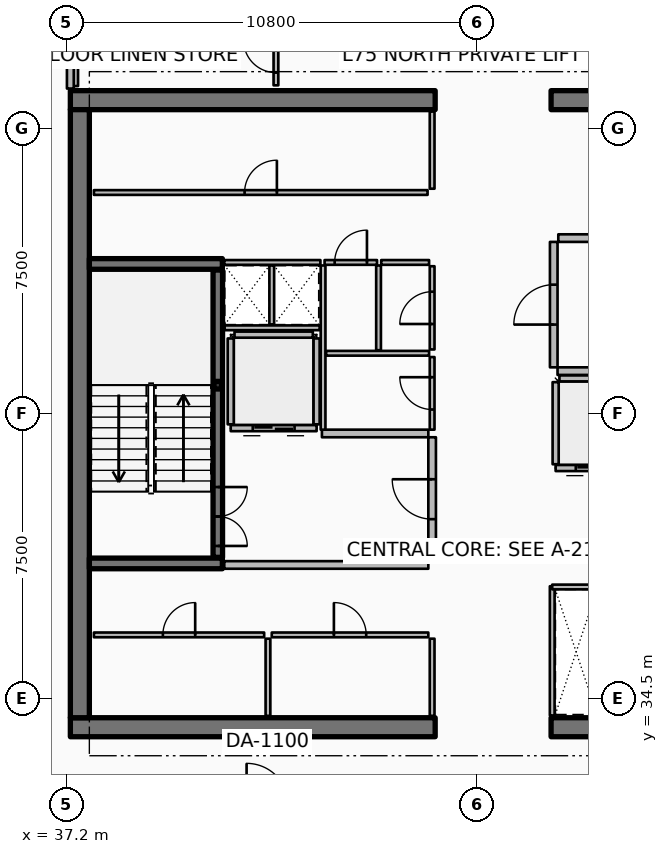
"""IFC4 building model, lengths in metres.
Left out: names, types, materials, properties, quantities, classifications, styles, units other than length and angle.
Written with IfcOpenShell. Run it as: python <this file> out.ifc"""

import sys

from ifc_helpers import new_model, si_unit, direction, frame, frame_2d, origin, origin_2d, place, context, subcontext, project, spatial, rectangle, hollow_rectangle, extrude, element, fill, save


model = new_model("IFC4")
c1 = context("Model", 3, precision=1e-05, world=origin(), true_north=direction((0.0, 1.0)))
c2 = subcontext(c1, "Body", "Model", "MODEL_VIEW")
j1 = project(units=[si_unit("LENGTHUNIT", "METRE"), si_unit("PLANEANGLEUNIT", "RADIAN")], contexts=[c1])
p1 = place(None, origin())
s1 = spatial("IfcSite", under=j1, at=p1, CompositionType="ELEMENT")
p2 = place(p1, origin())
s2 = spatial("IfcBuilding", under=s1, at=p2, CompositionType="ELEMENT")
p3 = place(p2, frame((0.0, 0.0, 298.3)))
s3 = spatial("IfcBuildingStorey", under=s2, at=p3, CompositionType="ELEMENT", Elevation=298.3)
p4 = place(p3, frame((37.3, 33.75, 0.0), z_axis=(0.0, 0.0, 1.0), x_axis=(1.0, 0.0, 0.0)))
e1 = element("IfcWall", 1, at=p4, inside=s3, PredefinedType="SHEAR", context=c2, shape_type="SweptSolid", body=[
    extrude(rectangle(XDim=9.6, YDim=0.5, at=frame_2d((4.8, 0.0))), origin(), (0.0, 0.0, 1.0), 3.85),
])
p5 = place(p3, frame((49.95, 33.75, 0.0), z_axis=(0.0, 0.0, 1.0), x_axis=(1.0, 0.0, 0.0)))
e2 = element("IfcWall", 2, at=p5, inside=s3, PredefinedType="SHEAR", context=c2, shape_type="SweptSolid", body=[
    extrude(rectangle(XDim=9.6, YDim=0.5, at=frame_2d((4.8, 0.0))), origin(), (0.0, 0.0, 1.0), 3.85),
])
p6 = place(p3, frame((37.3, 50.25, 0.0), z_axis=(0.0, 0.0, 1.0), x_axis=(1.0, 0.0, 0.0)))
e3 = element("IfcWall", 3, at=p6, inside=s3, PredefinedType="SHEAR", context=c2, shape_type="SweptSolid", body=[
    extrude(rectangle(XDim=9.6, YDim=0.5, at=frame_2d((4.8, 0.0))), origin(), (0.0, 0.0, 1.0), 3.85),
])
p7 = place(p3, frame((49.95, 50.25, 0.0), z_axis=(0.0, 0.0, 1.0), x_axis=(1.0, 0.0, 0.0)))
e4 = element("IfcWall", 4, at=p7, inside=s3, PredefinedType="SHEAR", context=c2, shape_type="SweptSolid", body=[
    extrude(rectangle(XDim=9.6, YDim=0.5, at=frame_2d((4.8, 0.0))), origin(), (0.0, 0.0, 1.0), 3.85),
])
p8 = place(p3, frame((37.55, 34.0, 0.0), z_axis=(0.0, 0.0, 1.0), x_axis=(0.0, 1.0, 0.0)))
e5 = element("IfcWall", 5, at=p8, inside=s3, PredefinedType="SHEAR", context=c2, shape_type="SweptSolid", body=[
    extrude(rectangle(XDim=16.0, YDim=0.5, at=frame_2d((8.0, 0.0))), origin(), (0.0, 0.0, 1.0), 3.85),
])
for number, where, z_axis, x_axis in (
    (6, (37.8, 38.06, 0.0), (0.0, 0.0, 1.0), (1.0, 0.0, 0.0)),
    (7, (37.8, 45.94, 0.0), (0.0, 0.0, 1.0), (1.0, 0.0, 0.0)),
):
    element("IfcWall", number, at=place(p3, frame(where, z_axis=z_axis, x_axis=x_axis)), inside=s3, PredefinedType="SHEAR", context=c2, shape_type="SweptSolid", body=[
        extrude(rectangle(XDim=3.5, YDim=0.28, at=frame_2d((1.75, 0.0))), origin(), (0.0, 0.0, 1.0), 3.85),
    ])
p9 = place(p3, frame((41.18, 42.75, 0.0), z_axis=(0.0, 0.0, 1.0), x_axis=(1.0, 0.0, 0.0)))
e8 = element("IfcColumn", 8, at=p9, inside=s3, PredefinedType="COLUMN", context=c2, shape_type="SweptSolid", body=[
    extrude(hollow_rectangle(XDim=0.2, YDim=0.2, WallThickness=0.01, InnerFilletRadius=0.01, OuterFilletRadius=0.02, at=origin_2d()), origin(), (0.0, 0.0, 1.0), 1.72),
])
p10 = place(p3, frame((41.18, 38.22, 0.0), z_axis=(0.0, 0.0, 1.0), x_axis=(0.0, 1.0, 0.0)))
e9 = element("IfcWall", 9, at=p10, inside=s3, PredefinedType="SOLIDWALL", context=c2, shape_type="SweptSolid", body=[
    extrude(rectangle(XDim=7.56, YDim=0.25, at=frame_2d((3.78, 0.0))), origin(), (0.0, 0.0, 1.0), 3.59),
])
p11 = place(p10, frame((0.3, 0.0, 0.0)))
e10 = element("IfcOpeningElement", 10, at=p11, cuts=e9, PredefinedType="OPENING", context=c2, shape_type="SweptSolid", body=[
    extrude(rectangle(XDim=1.55, YDim=2.15, at=frame_2d((0.775, 1.075))), frame((0.0, 0.135, 0.0), z_axis=(0.0, -1.0, 0.0), x_axis=(1.0, 0.0, 0.0)), (0.0, 0.0, 1.0), 0.27),
])
p12 = place(p3, frame((43.78, 41.62, 0.0), z_axis=(0.0, 0.0, 1.0), x_axis=(-1.0, 0.0, 0.0)))
e11 = element("IfcWall", 11, at=p12, inside=s3, PredefinedType="PARTITIONING", context=c2, shape_type="SweptSolid", body=[
    extrude(rectangle(XDim=2.26, YDim=0.16, at=frame_2d((1.13, 0.0))), origin(), (0.0, 0.0, 1.0), 3.59),
])
p13 = place(p12, frame((0.58, 0.0, 0.0)))
e12 = element("IfcOpeningElement", 12, at=p13, cuts=e11, PredefinedType="OPENING", context=c2, shape_type="SweptSolid", body=[
    extrude(rectangle(XDim=1.1, YDim=2.1, at=frame_2d((0.55, 1.05))), frame((0.0, 0.09, 0.0), z_axis=(0.0, -1.0, 0.0), x_axis=(1.0, 0.0, 0.0)), (0.0, 0.0, 1.0), 0.18),
])
for number, where, z_axis, x_axis in (
    (13, (43.78, 41.72, 0.0), (0.0, 0.0, 1.0), (0.0, 1.0, 0.0)),
    (14, (41.52, 41.72, 0.0), (0.0, 0.0, 1.0), (0.0, 1.0, 0.0)),
):
    element("IfcWall", number, at=place(p3, frame(where, z_axis=z_axis, x_axis=x_axis)), inside=s3, PredefinedType="PARTITIONING", context=c2, shape_type="SweptSolid", body=[
        extrude(rectangle(XDim=2.26, YDim=0.16, at=frame_2d((1.13, 0.0))), origin(), (0.0, 0.0, 1.0), 3.59),
    ])
p14 = place(p3, frame((41.62, 44.08, 0.0), z_axis=(0.0, 0.0, 1.0), x_axis=(1.0, 0.0, 0.0)))
e15 = element("IfcWall", 15, at=p14, inside=s3, PredefinedType="PARTITIONING", context=c2, shape_type="SweptSolid", body=[
    extrude(rectangle(XDim=2.06, YDim=0.16, at=frame_2d((1.03, 0.0))), origin(), (0.0, 0.0, 1.0), 3.59),
])
p15 = place(p3, frame((52.23, 40.57, 0.0), z_axis=(0.0, 0.0, 1.0), x_axis=(-1.0, 0.0, 0.0)))
e16 = element("IfcWall", 16, at=p15, inside=s3, PredefinedType="PARTITIONING", context=c2, shape_type="SweptSolid", body=[
    extrude(rectangle(XDim=2.16, YDim=0.16, at=frame_2d((1.08, 0.0))), origin(), (0.0, 0.0, 1.0), 3.59),
])
p16 = place(p15, frame((0.53, 0.0, 0.0)))
e17 = element("IfcOpeningElement", 17, at=p16, cuts=e16, PredefinedType="OPENING", context=c2, shape_type="SweptSolid", body=[
    extrude(rectangle(XDim=1.1, YDim=2.1, at=frame_2d((0.55, 1.05))), frame((0.0, 0.09, 0.0), z_axis=(0.0, -1.0, 0.0), x_axis=(1.0, 0.0, 0.0)), (0.0, 0.0, 1.0), 0.18),
])
p17 = place(p3, frame((50.07, 40.67, 0.0), z_axis=(0.0, 0.0, 1.0), x_axis=(0.0, 1.0, 0.0)))
e18 = element("IfcWall", 18, at=p17, inside=s3, PredefinedType="PARTITIONING", context=c2, shape_type="SweptSolid", body=[
    extrude(rectangle(XDim=2.16, YDim=0.16, at=frame_2d((1.08, 0.0))), origin(), (0.0, 0.0, 1.0), 3.59),
])
p18 = place(p3, frame((50.17, 42.93, 0.0), z_axis=(0.0, 0.0, 1.0), x_axis=(1.0, 0.0, 0.0)))
e19 = element("IfcWall", 19, at=p18, inside=s3, PredefinedType="PARTITIONING", context=c2, shape_type="SweptSolid", body=[
    extrude(rectangle(XDim=1.96, YDim=0.16, at=frame_2d((0.98, 0.0))), origin(), (0.0, 0.0, 1.0), 3.59),
])
for number, where, z_axis, x_axis in (
    (20, (46.82, 34.05, 0.0), (0.0, 0.0, 1.0), (0.0, 1.0, 0.0)),
    (21, (42.5, 34.05, 0.0), (0.0, 0.0, 1.0), (0.0, 1.0, 0.0)),
):
    element("IfcWall", number, at=place(p3, frame(where, z_axis=z_axis, x_axis=x_axis)), inside=s3, PredefinedType="PARTITIONING", context=c2, shape_type="SweptSolid", body=[
        extrude(rectangle(XDim=2.03, YDim=0.125, at=frame_2d((1.015, 0.0))), origin(), (0.0, 0.0, 1.0), 3.03),
    ])
p19 = place(p3, frame((37.92, 36.18, 0.0), z_axis=(0.0, 0.0, 1.0), x_axis=(1.0, 0.0, 0.0)))
e22 = element("IfcWall", 22, at=p19, inside=s3, PredefinedType="PARTITIONING", context=c2, shape_type="SweptSolid", body=[
    extrude(rectangle(XDim=4.48, YDim=0.125, at=frame_2d((2.24, 0.0))), origin(), (0.0, 0.0, 1.0), 3.03),
])
p20 = place(p19, frame((1.815, 0.0, 0.0)))
e23 = element("IfcOpeningElement", 23, at=p20, cuts=e22, PredefinedType="OPENING", context=c2, shape_type="SweptSolid", body=[
    extrude(rectangle(XDim=0.85, YDim=2.06, at=frame_2d((0.425, 1.03))), frame((0.0, 0.073, 0.0), z_axis=(0.0, -1.0, 0.0), x_axis=(1.0, 0.0, 0.0)), (0.0, 0.0, 1.0), 0.145),
])
p21 = place(p3, frame((42.6, 36.18, 0.0), z_axis=(0.0, 0.0, 1.0), x_axis=(1.0, 0.0, 0.0)))
e24 = element("IfcWall", 24, at=p21, inside=s3, PredefinedType="PARTITIONING", context=c2, shape_type="SweptSolid", body=[
    extrude(rectangle(XDim=4.12, YDim=0.125, at=frame_2d((2.06, 0.0))), origin(), (0.0, 0.0, 1.0), 3.03),
])
p22 = place(p21, frame((1.635, 0.0, 0.0)))
e25 = element("IfcOpeningElement", 25, at=p22, cuts=e24, PredefinedType="OPENING", context=c2, shape_type="SweptSolid", body=[
    extrude(rectangle(XDim=0.85, YDim=2.06, at=frame_2d((0.425, 1.03))), frame((0.0, 0.073, 0.0), z_axis=(0.0, -1.0, 0.0), x_axis=(1.0, 0.0, 0.0)), (0.0, 0.0, 1.0), 0.145),
])
p23 = place(p3, frame((46.82, 47.92, 0.0), z_axis=(0.0, 0.0, 1.0), x_axis=(0.0, 1.0, 0.0)))
e26 = element("IfcWall", 26, at=p23, inside=s3, PredefinedType="PARTITIONING", context=c2, shape_type="SweptSolid", body=[
    extrude(rectangle(XDim=2.03, YDim=0.125, at=frame_2d((1.015, 0.0))), origin(), (0.0, 0.0, 1.0), 3.03),
])
p24 = place(p3, frame((37.92, 47.82, 0.0), z_axis=(0.0, 0.0, 1.0), x_axis=(1.0, 0.0, 0.0)))
e27 = element("IfcWall", 27, at=p24, inside=s3, PredefinedType="PARTITIONING", context=c2, shape_type="SweptSolid", body=[
    extrude(rectangle(XDim=8.78, YDim=0.125, at=frame_2d((4.39, 0.0))), origin(), (0.0, 0.0, 1.0), 3.03),
])
p25 = place(p24, frame((3.965, 0.0, 0.0)))
e28 = element("IfcOpeningElement", 28, at=p25, cuts=e27, PredefinedType="OPENING", context=c2, shape_type="SweptSolid", body=[
    extrude(rectangle(XDim=0.85, YDim=2.06, at=frame_2d((0.425, 1.03))), frame((0.0, 0.073, 0.0), z_axis=(0.0, -1.0, 0.0), x_axis=(1.0, 0.0, 0.0)), (0.0, 0.0, 1.0), 0.145),
])
p26 = place(p3, frame((41.35, 38.02, 0.0), z_axis=(0.0, 0.0, 1.0), x_axis=(1.0, 0.0, 0.0)))
e29 = element("IfcWall", 29, at=p26, inside=s3, PredefinedType="PARTITIONING", context=c2, shape_type="SweptSolid", body=[
    extrude(rectangle(XDim=5.37, YDim=0.2, at=frame_2d((2.685, 0.0))), origin(), (0.0, 0.0, 1.0), 3.59),
])
p27 = place(p3, frame((43.92, 41.48, 0.0), z_axis=(0.0, 0.0, 1.0), x_axis=(1.0, 0.0, 0.0)))
e30 = element("IfcWall", 30, at=p27, inside=s3, PredefinedType="PARTITIONING", context=c2, shape_type="SweptSolid", body=[
    extrude(rectangle(XDim=2.8, YDim=0.2, at=frame_2d((1.4, 0.0))), origin(), (0.0, 0.0, 1.0), 3.59),
])
p28 = place(p3, frame((46.82, 38.12, 0.0), z_axis=(0.0, 0.0, 1.0), x_axis=(0.0, 1.0, 0.0)))
e31 = element("IfcWall", 31, at=p28, inside=s3, PredefinedType="PARTITIONING", context=c2, shape_type="SweptSolid", body=[
    extrude(rectangle(XDim=3.26, YDim=0.2, at=frame_2d((1.63, 0.0))), origin(), (0.0, 0.0, 1.0), 3.59),
])
p29 = place(p28, frame((1.105, 0.0, 0.0)))
e32 = element("IfcOpeningElement", 32, at=p29, cuts=e31, PredefinedType="OPENING", context=c2, shape_type="SweptSolid", body=[
    extrude(rectangle(XDim=1.05, YDim=2.1, at=frame_2d((0.525, 1.05))), frame((0.0, 0.11, 0.0), z_axis=(0.0, -1.0, 0.0), x_axis=(1.0, 0.0, 0.0)), (0.0, 0.0, 1.0), 0.22),
])
p30 = place(p3, frame((50.12, 43.12, 0.0), z_axis=(0.0, 0.0, 1.0), x_axis=(1.0, 0.0, 0.0)))
e33 = element("IfcWall", 33, at=p30, inside=s3, PredefinedType="PARTITIONING", context=c2, shape_type="SweptSolid", body=[
    extrude(rectangle(XDim=8.88, YDim=0.2, at=frame_2d((4.44, 0.0))), origin(), (0.0, 0.0, 1.0), 3.59),
])
p31 = place(p3, frame((50.14, 46.62, 0.0), z_axis=(0.0, 0.0, 1.0), x_axis=(1.0, 0.0, 0.0)))
e34 = element("IfcWall", 34, at=p31, inside=s3, PredefinedType="PARTITIONING", context=c2, shape_type="SweptSolid", body=[
    extrude(rectangle(XDim=1.02, YDim=0.2, at=frame_2d((0.51, 0.0))), origin(), (0.0, 0.0, 1.0), 3.59),
])
p32 = place(p3, frame((50.02, 43.22, 0.0), z_axis=(0.0, 0.0, 1.0), x_axis=(0.0, 1.0, 0.0)))
e35 = element("IfcWall", 35, at=p32, inside=s3, PredefinedType="PARTITIONING", context=c2, shape_type="SweptSolid", body=[
    extrude(rectangle(XDim=3.3, YDim=0.2, at=frame_2d((1.65, 0.0))), origin(), (0.0, 0.0, 1.0), 3.59),
])
p33 = place(p32, frame((1.125, 0.0, 0.0)))
e36 = element("IfcOpeningElement", 36, at=p33, cuts=e35, PredefinedType="OPENING", context=c2, shape_type="SweptSolid", body=[
    extrude(rectangle(XDim=1.05, YDim=2.1, at=frame_2d((0.525, 1.05))), frame((0.0, 0.11, 0.0), z_axis=(0.0, -1.0, 0.0), x_axis=(1.0, 0.0, 0.0)), (0.0, 0.0, 1.0), 0.22),
])
p34 = place(p3, frame((41.36, 44.26, 0.0), z_axis=(0.0, 0.0, 1.0), x_axis=(1.0, 0.0, 0.0)))
e37 = element("IfcWall", 37, at=p34, inside=s3, PredefinedType="PARTITIONING", context=c2, shape_type="SweptSolid", body=[
    extrude(rectangle(XDim=2.5, YDim=0.125, at=frame_2d((1.25, 0.0))), origin(), (0.0, 0.0, 1.0), 3.03),
])
p35 = place(p3, frame((42.6, 44.35, 0.0), z_axis=(0.0, 0.0, 1.0), x_axis=(0.0, 1.0, 0.0)))
e38 = element("IfcWall", 38, at=p35, inside=s3, PredefinedType="PARTITIONING", context=c2, shape_type="SweptSolid", body=[
    extrude(rectangle(XDim=1.55, YDim=0.125, at=frame_2d((0.775, 0.0))), origin(), (0.0, 0.0, 1.0), 3.03),
])
p36 = place(p3, frame((49.98, 34.06, 0.0), z_axis=(0.0, 0.0, 1.0), x_axis=(0.0, 1.0, 0.0)))
e39 = element("IfcWall", 39, at=p36, inside=s3, PredefinedType="PARTITIONING", context=c2, shape_type="SweptSolid", body=[
    extrude(rectangle(XDim=3.4, YDim=0.125, at=frame_2d((1.7, 0.0))), origin(), (0.0, 0.0, 1.0), 3.03),
])
p37 = place(p3, frame((49.98, 37.44, 0.0), z_axis=(0.0, 0.0, 1.0), x_axis=(1.0, 0.0, 0.0)))
e40 = element("IfcWall", 40, at=p37, inside=s3, PredefinedType="PARTITIONING", context=c2, shape_type="SweptSolid", body=[
    extrude(rectangle(XDim=1.26, YDim=0.125, at=frame_2d((0.63, 0.0))), origin(), (0.0, 0.0, 1.0), 3.03),
])
p38 = place(p3, frame((43.95, 41.58, 0.0), z_axis=(0.0, 0.0, 1.0), x_axis=(0.0, 1.0, 0.0)))
e41 = element("IfcWall", 41, at=p38, inside=s3, PredefinedType="PARTITIONING", context=c2, shape_type="SweptSolid", body=[
    extrude(rectangle(XDim=4.32, YDim=0.125, at=frame_2d((2.16, 0.0))), origin(), (0.0, 0.0, 1.0), 3.03),
])
p39 = place(p3, frame((44.03, 43.59, 0.0), z_axis=(0.0, 0.0, 1.0), x_axis=(1.0, 0.0, 0.0)))
e42 = element("IfcWall", 42, at=p39, inside=s3, PredefinedType="PARTITIONING", context=c2, shape_type="SweptSolid", body=[
    extrude(rectangle(XDim=2.71, YDim=0.125, at=frame_2d((1.355, 0.0))), origin(), (0.0, 0.0, 1.0), 3.03),
])
p40 = place(p3, frame((45.41, 43.67, 0.0), z_axis=(0.0, 0.0, 1.0), x_axis=(0.0, 1.0, 0.0)))
e43 = element("IfcWall", 43, at=p40, inside=s3, PredefinedType="PARTITIONING", context=c2, shape_type="SweptSolid", body=[
    extrude(rectangle(XDim=2.23, YDim=0.125, at=frame_2d((1.115, 0.0))), origin(), (0.0, 0.0, 1.0), 3.03),
])
p41 = place(p3, frame((46.82, 41.58, 0.0), z_axis=(0.0, 0.0, 1.0), x_axis=(0.0, 1.0, 0.0)))
e44 = element("IfcWall", 44, at=p41, inside=s3, PredefinedType="PARTITIONING", context=c2, shape_type="SweptSolid", body=[
    extrude(rectangle(XDim=1.91, YDim=0.125, at=frame_2d((0.955, 0.0))), origin(), (0.0, 0.0, 1.0), 3.03),
])
p42 = place(p41, frame((0.53, 0.0, 0.0)))
e45 = element("IfcOpeningElement", 45, at=p42, cuts=e44, PredefinedType="OPENING", context=c2, shape_type="SweptSolid", body=[
    extrude(rectangle(XDim=0.85, YDim=2.06, at=frame_2d((0.425, 1.03))), frame((0.0, 0.073, 0.0), z_axis=(0.0, -1.0, 0.0), x_axis=(1.0, 0.0, 0.0)), (0.0, 0.0, 1.0), 0.145),
])
p43 = place(p3, frame((46.82, 43.69, 0.0), z_axis=(0.0, 0.0, 1.0), x_axis=(0.0, 1.0, 0.0)))
e46 = element("IfcWall", 46, at=p43, inside=s3, PredefinedType="PARTITIONING", context=c2, shape_type="SweptSolid", body=[
    extrude(rectangle(XDim=2.19, YDim=0.125, at=frame_2d((1.095, 0.0))), origin(), (0.0, 0.0, 1.0), 3.03),
])
p44 = place(p43, frame((0.67, 0.0, 0.0)))
e47 = element("IfcOpeningElement", 47, at=p44, cuts=e46, PredefinedType="OPENING", context=c2, shape_type="SweptSolid", body=[
    extrude(rectangle(XDim=0.85, YDim=2.06, at=frame_2d((0.425, 1.03))), frame((0.0, 0.073, 0.0), z_axis=(0.0, -1.0, 0.0), x_axis=(1.0, 0.0, 0.0)), (0.0, 0.0, 1.0), 0.145),
])
p45 = place(p3, frame((41.35, 45.98, 0.0), z_axis=(0.0, 0.0, 1.0), x_axis=(1.0, 0.0, 0.0)))
e48 = element("IfcWall", 48, at=p45, inside=s3, PredefinedType="PARTITIONING", context=c2, shape_type="SweptSolid", body=[
    extrude(rectangle(XDim=2.53, YDim=0.125, at=frame_2d((1.265, 0.0))), origin(), (0.0, 0.0, 1.0), 3.03),
])
p46 = place(p3, frame((43.99, 45.98, 0.0), z_axis=(0.0, 0.0, 1.0), x_axis=(1.0, 0.0, 0.0)))
e49 = element("IfcWall", 49, at=p46, inside=s3, PredefinedType="PARTITIONING", context=c2, shape_type="SweptSolid", body=[
    extrude(rectangle(XDim=1.38, YDim=0.125, at=frame_2d((0.69, 0.0))), origin(), (0.0, 0.0, 1.0), 3.03),
])
p47 = place(p46, frame((0.265, 0.0, 0.0)))
e50 = element("IfcOpeningElement", 50, at=p47, cuts=e49, PredefinedType="OPENING", context=c2, shape_type="SweptSolid", body=[
    extrude(rectangle(XDim=0.85, YDim=2.06, at=frame_2d((0.425, 1.03))), frame((0.0, 0.073, 0.0), z_axis=(0.0, -1.0, 0.0), x_axis=(1.0, 0.0, 0.0)), (0.0, 0.0, 1.0), 0.145),
])
p48 = place(p3, frame((45.48, 45.98, 0.0), z_axis=(0.0, 0.0, 1.0), x_axis=(1.0, 0.0, 0.0)))
e51 = element("IfcWall", 51, at=p48, inside=s3, PredefinedType="PARTITIONING", context=c2, shape_type="SweptSolid", body=[
    extrude(rectangle(XDim=1.26, YDim=0.125, at=frame_2d((0.63, 0.0))), origin(), (0.0, 0.0, 1.0), 3.03),
])
p49 = place(p3, frame((37.44, 50.62, 0.0), z_axis=(0.0, 0.0, 1.0), x_axis=(0.0, 1.0, 0.0)))
e52 = element("IfcWall", 52, at=p49, inside=s3, PredefinedType="PARTITIONING", context=c2, shape_type="SweptSolid", body=[
    extrude(rectangle(XDim=1.54, YDim=0.125, at=frame_2d((0.77, 0.0))), origin(), (0.0, 0.0, 1.0), 3.03),
])
p50 = place(p3, frame((42.71, 50.64, 0.0), z_axis=(0.0, 0.0, 1.0), x_axis=(0.0, 1.0, 0.0)))
e53 = element("IfcWall", 53, at=p50, inside=s3, PredefinedType="PARTITIONING", context=c2, shape_type="SweptSolid", body=[
    extrude(rectangle(XDim=1.52, YDim=0.125, at=frame_2d((0.76, 0.0))), origin(), (0.0, 0.0, 1.0), 2.957),
])
p51 = place(p50, frame((0.335, 0.0, 0.0)))
e54 = element("IfcOpeningElement", 54, at=p51, cuts=e53, PredefinedType="OPENING", context=c2, shape_type="SweptSolid", body=[
    extrude(rectangle(XDim=0.85, YDim=2.06, at=frame_2d((0.425, 1.03))), frame((0.0, 0.073, 0.0), z_axis=(0.0, -1.0, 0.0), x_axis=(1.0, 0.0, 0.0)), (0.0, 0.0, 1.0), 0.145),
])
p52 = place(p3, frame((37.3, 52.18, 0.0), z_axis=(0.0, 0.0, 1.0), x_axis=(0.0, -1.0, 0.0)))
e55 = element("IfcWall", 55, at=p52, inside=s3, PredefinedType="PARTITIONING", context=c2, shape_type="SweptSolid", body=[
    extrude(rectangle(XDim=1.625, YDim=0.18, at=frame_2d((0.812, 0.0))), origin(), (0.0, 0.0, 1.0), 2.957),
])
p53 = place(p11, origin())
e56 = element("IfcDoor", 56, at=p53, inside=s3, OperationType="DOUBLE_DOOR_SINGLE_SWING", PredefinedType="DOOR", context=c2, shape_type="SweptSolid", body=[
    extrude(rectangle(XDim=1.55, YDim=2.15, at=frame_2d((0.775, 1.075))), frame((0.0, 0.025, 0.0), z_axis=(0.0, -1.0, 0.0), x_axis=(1.0, 0.0, 0.0)), (0.0, 0.0, 1.0), 0.05),
])
fill(e10, e56)
p54 = place(p13, origin())
e57 = element("IfcDoor", 57, at=p54, inside=s3, OperationType="DOUBLE_DOOR_SLIDING", PredefinedType="DOOR", context=c2, shape_type="SweptSolid", body=[
    extrude(rectangle(XDim=1.1, YDim=2.1, at=frame_2d((0.55, 1.05))), frame((0.0, 0.025, 0.0), z_axis=(0.0, -1.0, 0.0), x_axis=(1.0, 0.0, 0.0)), (0.0, 0.0, 1.0), 0.05),
])
fill(e12, e57)
p55 = place(p16, origin())
e58 = element("IfcDoor", 58, at=p55, inside=s3, OperationType="DOUBLE_DOOR_SLIDING", PredefinedType="DOOR", context=c2, shape_type="SweptSolid", body=[
    extrude(rectangle(XDim=1.1, YDim=2.1, at=frame_2d((0.55, 1.05))), frame((0.0, 0.025, 0.0), z_axis=(0.0, -1.0, 0.0), x_axis=(1.0, 0.0, 0.0)), (0.0, 0.0, 1.0), 0.05),
])
fill(e17, e58)
p56 = place(p20, origin())
e59 = element("IfcDoor", 59, at=p56, inside=s3, OperationType="SINGLE_SWING_RIGHT", PredefinedType="DOOR", context=c2, shape_type="SweptSolid", body=[
    extrude(rectangle(XDim=0.85, YDim=2.06, at=frame_2d((0.425, 1.03))), frame((0.0, 0.025, 0.0), z_axis=(0.0, -1.0, 0.0), x_axis=(1.0, 0.0, 0.0)), (0.0, 0.0, 1.0), 0.05),
])
fill(e23, e59)
p57 = place(p22, origin())
e60 = element("IfcDoor", 60, at=p57, inside=s3, OperationType="SINGLE_SWING_LEFT", PredefinedType="DOOR", context=c2, shape_type="SweptSolid", body=[
    extrude(rectangle(XDim=0.85, YDim=2.06, at=frame_2d((0.425, 1.03))), frame((0.0, 0.025, 0.0), z_axis=(0.0, -1.0, 0.0), x_axis=(1.0, 0.0, 0.0)), (0.0, 0.0, 1.0), 0.05),
])
fill(e25, e60)
p58 = place(p25, origin())
e61 = element("IfcDoor", 61, at=p58, inside=s3, OperationType="SINGLE_SWING_RIGHT", PredefinedType="DOOR", context=c2, shape_type="SweptSolid", body=[
    extrude(rectangle(XDim=0.85, YDim=2.06, at=frame_2d((0.425, 1.03))), frame((0.0, 0.025, 0.0), z_axis=(0.0, -1.0, 0.0), x_axis=(1.0, 0.0, 0.0)), (0.0, 0.0, 1.0), 0.05),
])
fill(e28, e61)
p59 = place(p29, origin())
e62 = element("IfcDoor", 62, at=p59, inside=s3, OperationType="SINGLE_SWING_RIGHT", PredefinedType="DOOR", context=c2, shape_type="SweptSolid", body=[
    extrude(rectangle(XDim=1.05, YDim=2.1, at=frame_2d((0.525, 1.05))), frame((0.0, 0.025, 0.0), z_axis=(0.0, -1.0, 0.0), x_axis=(1.0, 0.0, 0.0)), (0.0, 0.0, 1.0), 0.05),
])
fill(e32, e62)
p60 = place(p33, origin())
e63 = element("IfcDoor", 63, at=p60, inside=s3, OperationType="SINGLE_SWING_LEFT", PredefinedType="DOOR", context=c2, shape_type="SweptSolid", body=[
    extrude(rectangle(XDim=1.05, YDim=2.1, at=frame_2d((0.525, 1.05))), frame((0.0, 0.025, 0.0), z_axis=(0.0, -1.0, 0.0), x_axis=(1.0, 0.0, 0.0)), (0.0, 0.0, 1.0), 0.05),
])
fill(e36, e63)
p61 = place(p42, origin())
e64 = element("IfcDoor", 64, at=p61, inside=s3, OperationType="SINGLE_SWING_RIGHT", PredefinedType="DOOR", context=c2, shape_type="SweptSolid", body=[
    extrude(rectangle(XDim=0.85, YDim=2.06, at=frame_2d((0.425, 1.03))), frame((0.0, 0.025, 0.0), z_axis=(0.0, -1.0, 0.0), x_axis=(1.0, 0.0, 0.0)), (0.0, 0.0, 1.0), 0.05),
])
fill(e45, e64)
p62 = place(p44, origin())
e65 = element("IfcDoor", 65, at=p62, inside=s3, OperationType="SINGLE_SWING_LEFT", PredefinedType="DOOR", context=c2, shape_type="SweptSolid", body=[
    extrude(rectangle(XDim=0.85, YDim=2.06, at=frame_2d((0.425, 1.03))), frame((0.0, 0.025, 0.0), z_axis=(0.0, -1.0, 0.0), x_axis=(1.0, 0.0, 0.0)), (0.0, 0.0, 1.0), 0.05),
])
fill(e47, e65)
p63 = place(p47, origin())
e66 = element("IfcDoor", 66, at=p63, inside=s3, OperationType="SINGLE_SWING_RIGHT", PredefinedType="DOOR", context=c2, shape_type="SweptSolid", body=[
    extrude(rectangle(XDim=0.85, YDim=2.06, at=frame_2d((0.425, 1.03))), frame((0.0, 0.025, 0.0), z_axis=(0.0, -1.0, 0.0), x_axis=(1.0, 0.0, 0.0)), (0.0, 0.0, 1.0), 0.05),
])
fill(e50, e66)
p64 = place(p51, origin())
e67 = element("IfcDoor", 67, at=p64, inside=s3, OperationType="SINGLE_SWING_RIGHT", PredefinedType="DOOR", context=c2, shape_type="SweptSolid", body=[
    extrude(rectangle(XDim=0.85, YDim=2.06, at=frame_2d((0.425, 1.03))), frame((0.0, 0.025, 0.0), z_axis=(0.0, -1.0, 0.0), x_axis=(1.0, 0.0, 0.0)), (0.0, 0.0, 1.0), 0.05),
])
fill(e54, e67)
save(model, sys.argv[1])
